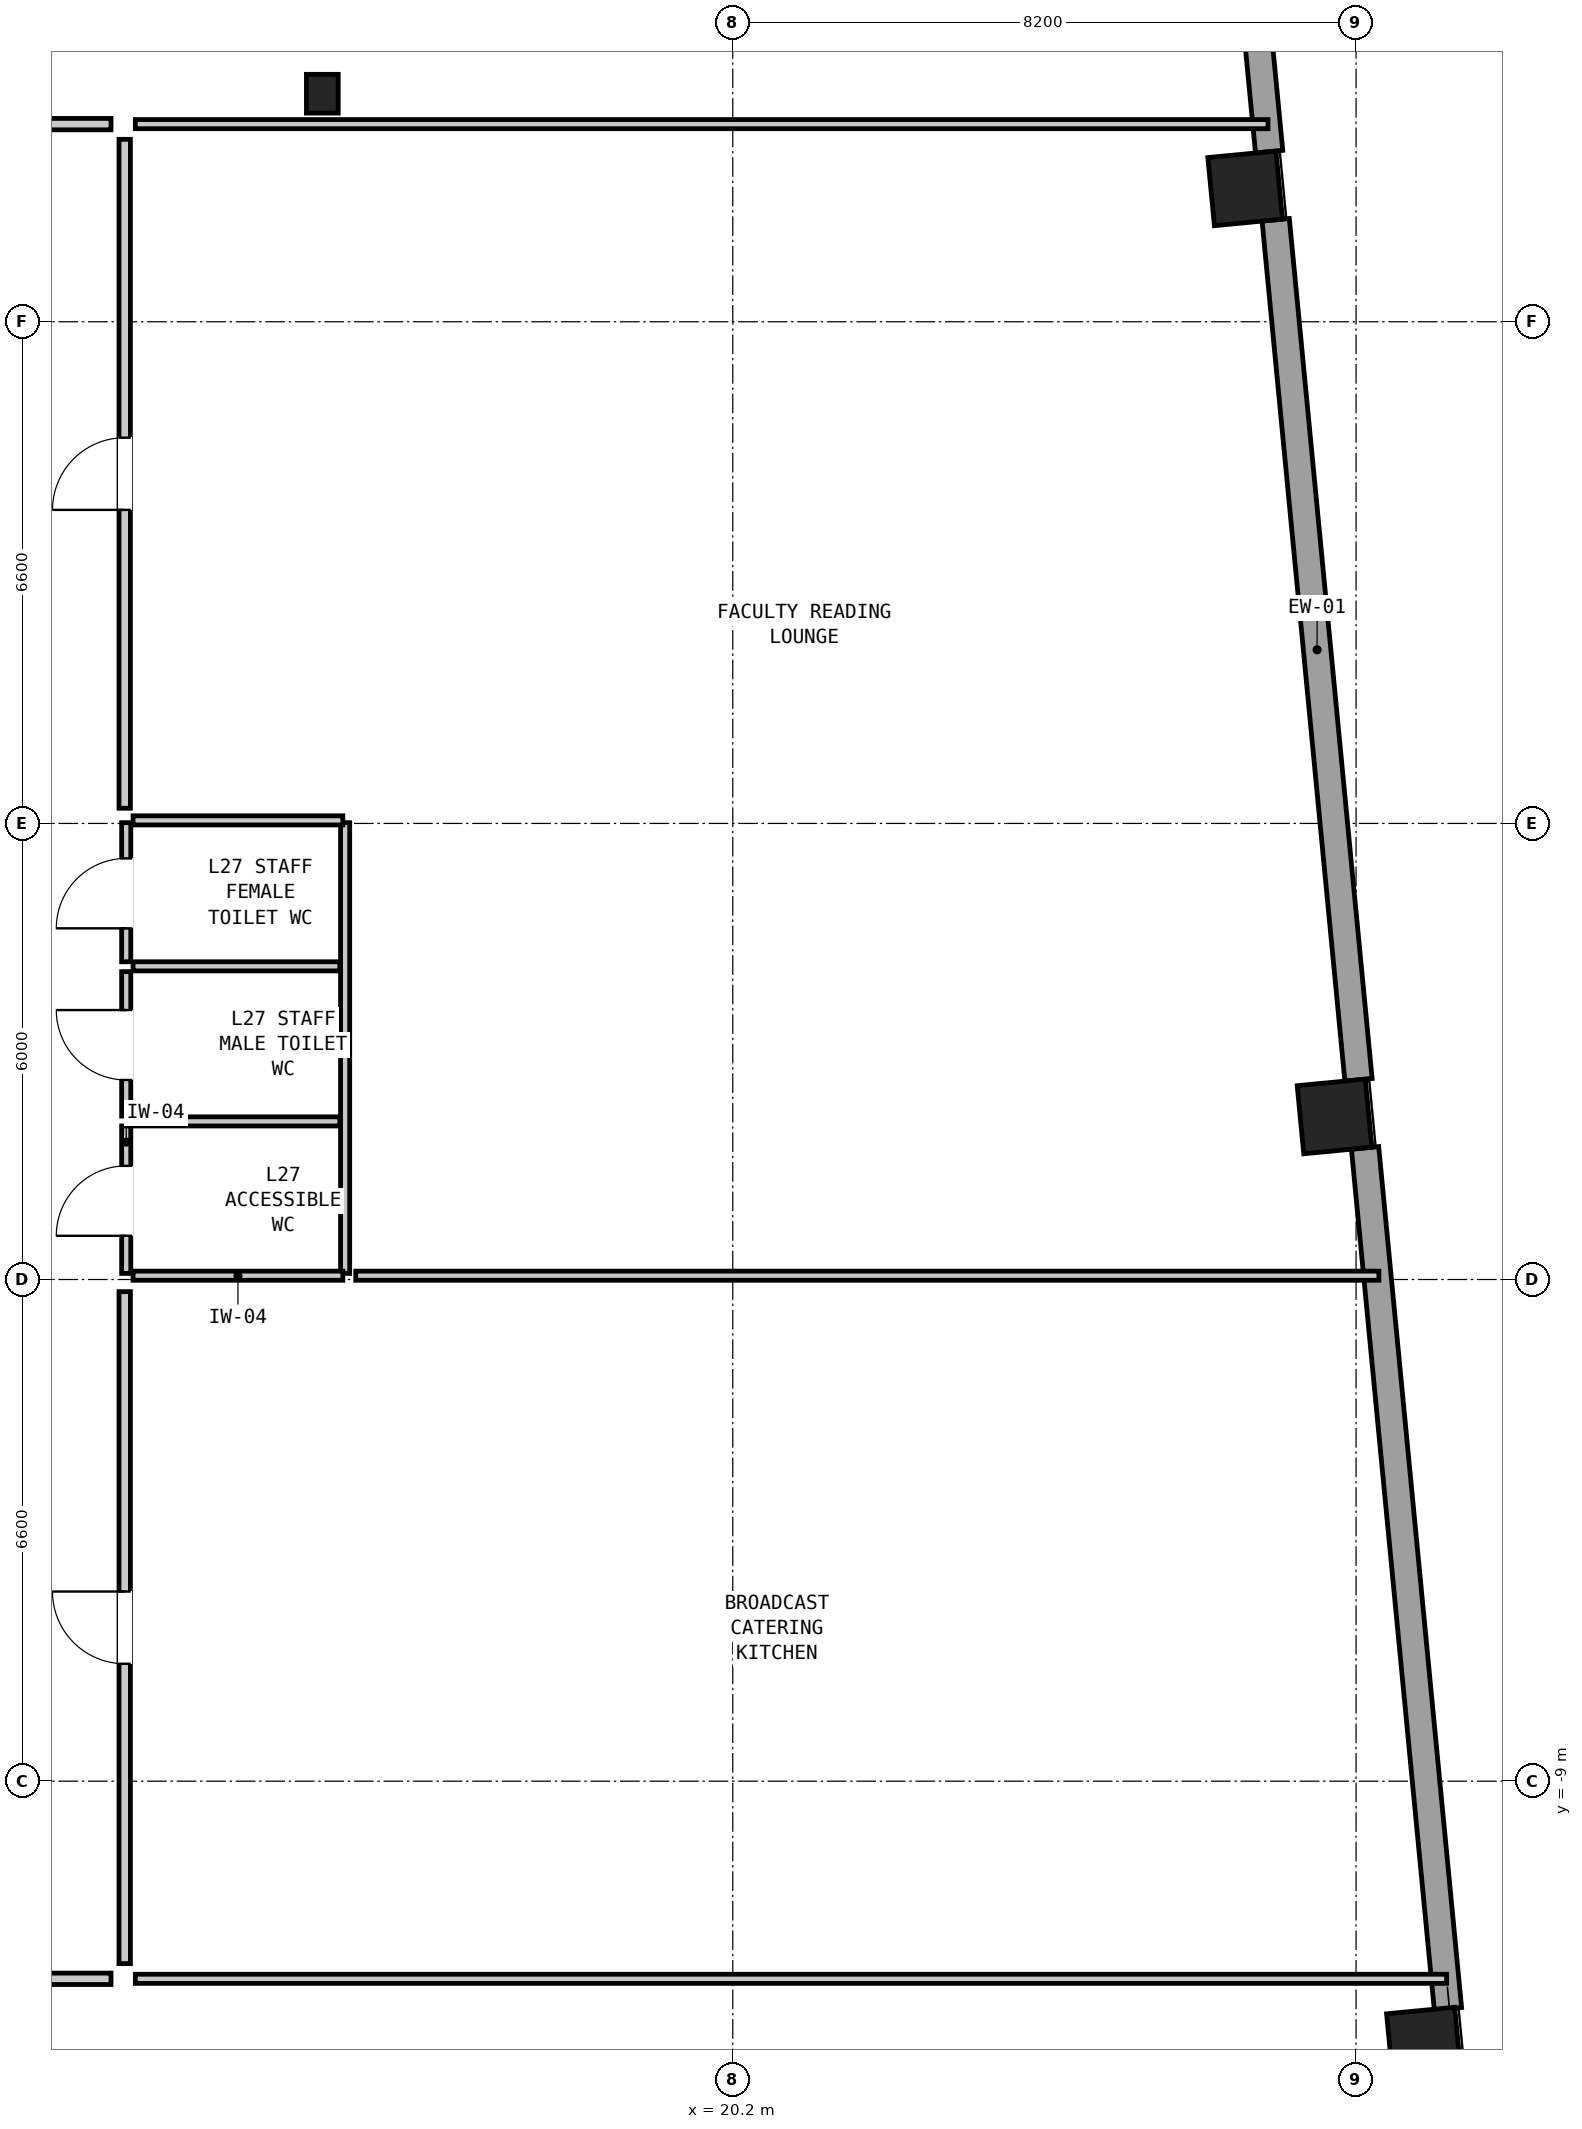
"""IFC4 building model, lengths in metres.
Left out: names, types, materials, properties, quantities, classifications, styles, units other than length and angle.
Written with IfcOpenShell. Run it as: python <this file> out.ifc"""

import sys

from ifc_helpers import new_model, si_unit, direction, frame, frame_2d, origin, origin_2d, place, context, subcontext, project, spatial, rectangle, hollow_rectangle, i_section, extrude, element, fill, save


model = new_model("IFC4")
c1 = context("Model", 3, precision=1e-05, world=origin(), true_north=direction((0.0, 1.0)))
c2 = subcontext(c1, "Body", "Model", "MODEL_VIEW")
j1 = project(units=[si_unit("LENGTHUNIT", "METRE"), si_unit("PLANEANGLEUNIT", "RADIAN")], contexts=[c1])
p1 = place(None, origin())
s1 = spatial("IfcSite", under=j1, at=p1, CompositionType="ELEMENT")
p2 = place(p1, origin())
s2 = spatial("IfcBuilding", under=s1, at=p2, CompositionType="ELEMENT")
p3 = place(p2, frame((0.0, 0.0, 93.85)))
s3 = spatial("IfcBuildingStorey", under=s2, at=p3, CompositionType="ELEMENT", Elevation=93.85)
for number, where, z_axis, x_axis in (
    (1, (29.292, -12.465, 0.0), (0.0, 0.0, 1.0), (-0.096, 0.995, 0.0)),
    (2, (28.117, -0.255, 0.0), (0.0, 0.0, 1.0), (-0.096, 0.995, 0.0)),
    (3, (26.941, 11.955, 0.0), (0.0, 0.0, 1.0), (-0.096, 0.995, 0.0)),
):
    element("IfcColumn", number, at=place(p3, frame(where, z_axis=z_axis, x_axis=x_axis)), inside=s3, PredefinedType="COLUMN", context=c2, shape_type="SweptSolid", body=[
        extrude(hollow_rectangle(XDim=0.9, YDim=0.9, WallThickness=0.055, at=origin_2d()), origin(), (0.0, 0.0, 1.0), 3.05),
    ])
p4 = place(p3, frame((14.8, 13.2, 0.0), z_axis=(0.0, 0.0, 1.0), x_axis=(1.0, 0.0, 0.0)))
e4 = element("IfcColumn", 4, at=p4, inside=s3, PredefinedType="COLUMN", context=c2, shape_type="SweptSolid", body=[
    extrude(i_section(OverallWidth=0.418, OverallDepth=0.51, WebThickness=0.042, FlangeThickness=0.068, at=origin_2d()), origin(), (0.0, 0.0, 1.0), 3.05),
])
p5 = place(p3, frame((26.166, 23.764, 0.0), z_axis=(0.0, 0.0, 1.0), x_axis=(0.095844869758, -0.995396283367, 0.0)))
e5 = element("IfcWall", 5, at=p5, inside=s3, PredefinedType="SOLIDWALL", context=c2, shape_type="SweptSolid", body=[
    extrude(rectangle(XDim=11.379, YDim=0.36, at=frame_2d((5.689, 0.0))), origin(), (0.0, 0.0, 1.0), 0.95),
])
p6 = place(p3, frame((27.343, 11.542, 0.0), z_axis=(0.0, 0.0, 1.0), x_axis=(0.09583887089, -0.995396860969, 0.0)))
e6 = element("IfcWall", 6, at=p6, inside=s3, PredefinedType="SOLIDWALL", context=c2, shape_type="SweptSolid", body=[
    extrude(rectangle(XDim=11.366, YDim=0.36, at=frame_2d((5.683, 0.0))), origin(), (0.0, 0.0, 1.0), 0.95),
])
p7 = place(p3, frame((28.518, -0.669, 0.0), z_axis=(0.0, 0.0, 1.0), x_axis=(0.095844869758, -0.995396283367, 0.0)))
e7 = element("IfcWall", 7, at=p7, inside=s3, PredefinedType="SOLIDWALL", context=c2, shape_type="SweptSolid", body=[
    extrude(rectangle(XDim=11.379, YDim=0.36, at=frame_2d((5.689, 0.0))), origin(), (0.0, 0.0, 1.0), 0.95),
])
p8 = place(p3, frame((12.22, -2.32, 0.0), z_axis=(0.0, 0.0, 1.0), x_axis=(0.0, 1.0, 0.0)))
e8 = element("IfcWall", 8, at=p8, inside=s3, PredefinedType="PARTITIONING", context=c2, shape_type="SweptSolid", body=[
    extrude(rectangle(XDim=1.94, YDim=0.12, at=frame_2d((0.97, 0.0))), origin(), (0.0, 0.0, 1.0), 2.83),
])
p9 = place(p8, frame((0.495, 0.0, 0.0)))
e9 = element("IfcOpeningElement", 9, at=p9, cuts=e8, PredefinedType="OPENING", context=c2, shape_type="SweptSolid", body=[
    extrude(rectangle(XDim=0.92, YDim=2.1, at=frame_2d((0.46, 1.05))), frame((0.0, 0.072, 0.0), z_axis=(0.0, -1.0, 0.0), x_axis=(1.0, 0.0, 0.0)), (0.0, 0.0, 1.0), 0.144),
])
p10 = place(p3, frame((12.22, -0.25, 0.0), z_axis=(0.0, 0.0, 1.0), x_axis=(0.0, 1.0, 0.0)))
e10 = element("IfcWall", 10, at=p10, inside=s3, PredefinedType="PARTITIONING", context=c2, shape_type="SweptSolid", body=[
    extrude(rectangle(XDim=1.9, YDim=0.12, at=frame_2d((0.95, 0.0))), origin(), (0.0, 0.0, 1.0), 2.83),
])
p11 = place(p10, frame((0.475, 0.0, 0.0)))
e11 = element("IfcOpeningElement", 11, at=p11, cuts=e10, PredefinedType="OPENING", context=c2, shape_type="SweptSolid", body=[
    extrude(rectangle(XDim=0.92, YDim=2.1, at=frame_2d((0.46, 1.05))), frame((0.0, 0.072, 0.0), z_axis=(0.0, -1.0, 0.0), x_axis=(1.0, 0.0, 0.0)), (0.0, 0.0, 1.0), 0.144),
])
p12 = place(p3, frame((12.22, 1.78, 0.0), z_axis=(0.0, 0.0, 1.0), x_axis=(0.0, 1.0, 0.0)))
e12 = element("IfcWall", 12, at=p12, inside=s3, PredefinedType="PARTITIONING", context=c2, shape_type="SweptSolid", body=[
    extrude(rectangle(XDim=1.83, YDim=0.12, at=frame_2d((0.915, 0.0))), origin(), (0.0, 0.0, 1.0), 2.83),
])
p13 = place(p12, frame((0.44, 0.0, 0.0)))
e13 = element("IfcOpeningElement", 13, at=p13, cuts=e12, PredefinedType="OPENING", context=c2, shape_type="SweptSolid", body=[
    extrude(rectangle(XDim=0.92, YDim=2.1, at=frame_2d((0.46, 1.05))), frame((0.0, 0.072, 0.0), z_axis=(0.0, -1.0, 0.0), x_axis=(1.0, 0.0, 0.0)), (0.0, 0.0, 1.0), 0.144),
])
p14 = place(p3, frame((15.1, -2.32, 0.0), z_axis=(0.0, 0.0, 1.0), x_axis=(0.0, 1.0, 0.0)))
e14 = element("IfcWall", 14, at=p14, inside=s3, PredefinedType="PARTITIONING", context=c2, shape_type="SweptSolid", body=[
    extrude(rectangle(XDim=5.93, YDim=0.12, at=frame_2d((2.965, 0.0))), origin(), (0.0, 0.0, 1.0), 2.83),
])
for number, where, z_axis, x_axis in (
    (15, (12.31, -2.35, 0.0), (0.0, 0.0, 1.0), (1.0, 0.0, 0.0)),
    (16, (12.31, 3.64, 0.0), (0.0, 0.0, 1.0), (1.0, 0.0, 0.0)),
):
    element("IfcWall", number, at=place(p3, frame(where, z_axis=z_axis, x_axis=x_axis)), inside=s3, PredefinedType="PARTITIONING", context=c2, shape_type="SweptSolid", body=[
        extrude(rectangle(XDim=2.76, YDim=0.12, at=frame_2d((1.38, 0.0))), origin(), (0.0, 0.0, 1.0), 1.01),
    ])
for number, where, z_axis, x_axis in (
    (17, (12.31, -0.32, 0.0), (0.0, 0.0, 1.0), (1.0, 0.0, 0.0)),
    (18, (12.31, 1.72, 0.0), (0.0, 0.0, 1.0), (1.0, 0.0, 0.0)),
):
    element("IfcWall", number, at=place(p3, frame(where, z_axis=z_axis, x_axis=x_axis)), inside=s3, PredefinedType="PARTITIONING", context=c2, shape_type="SweptSolid", body=[
        extrude(rectangle(XDim=2.72, YDim=0.12, at=frame_2d((1.36, 0.0))), origin(), (0.0, 0.0, 1.0), 2.83),
    ])
p15 = place(p3, frame((12.34, 12.8, 0.0), z_axis=(0.0, 0.0, 1.0), x_axis=(1.0, 0.0, 0.0)))
e19 = element("IfcWall", 19, at=p15, inside=s3, PredefinedType="PARTITIONING", context=c2, shape_type="SweptSolid", body=[
    extrude(rectangle(XDim=14.902, YDim=0.12, at=frame_2d((7.451, 0.0))), origin(), (0.0, 0.0, 1.0), 2.83),
])
p16 = place(p3, frame((12.34, -11.6, 0.0), z_axis=(0.0, 0.0, 1.0), x_axis=(1.0, 0.0, 0.0)))
e20 = element("IfcWall", 20, at=p16, inside=s3, PredefinedType="PARTITIONING", context=c2, shape_type="SweptSolid", body=[
    extrude(rectangle(XDim=17.251, YDim=0.12, at=frame_2d((8.625, 0.0))), origin(), (0.0, 0.0, 1.0), 2.274),
])
p17 = place(p3, frame((15.24, -2.35, 0.0), z_axis=(0.0, 0.0, 1.0), x_axis=(1.0, 0.0, 0.0)))
e21 = element("IfcWall", 21, at=p17, inside=s3, PredefinedType="PARTITIONING", context=c2, shape_type="SweptSolid", body=[
    extrude(rectangle(XDim=13.46, YDim=0.12, at=frame_2d((6.73, 0.0))), origin(), (0.0, 0.0, 1.0), 1.01),
])
p18 = place(p3, frame((5.58, 12.8, 0.0), z_axis=(0.0, 0.0, 1.0), x_axis=(1.0, 0.0, 0.0)))
e22 = element("IfcWall", 22, at=p18, inside=s3, PredefinedType="PARTITIONING", context=c2, shape_type="SweptSolid", body=[
    extrude(rectangle(XDim=6.44, YDim=0.15, at=frame_2d((3.22, 0.0))), origin(), (0.0, 0.0, 1.0), 2.83),
])
p19 = place(p18, frame((2.22, 0.0, 0.0)))
e23 = element("IfcOpeningElement", 23, at=p19, cuts=e22, PredefinedType="OPENING", context=c2, shape_type="SweptSolid", body=[
    extrude(rectangle(XDim=1.2, YDim=2.1, at=frame_2d((0.6, 1.05))), frame((0.0, 0.087, 0.0), z_axis=(0.0, -1.0, 0.0), x_axis=(1.0, 0.0, 0.0)), (0.0, 0.0, 1.0), 0.174),
])
p20 = place(p3, frame((0.18, -11.6, 0.0), z_axis=(0.0, 0.0, 1.0), x_axis=(1.0, 0.0, 0.0)))
e24 = element("IfcWall", 24, at=p20, inside=s3, PredefinedType="PARTITIONING", context=c2, shape_type="SweptSolid", body=[
    extrude(rectangle(XDim=11.84, YDim=0.15, at=frame_2d((5.92, 0.0))), origin(), (0.0, 0.0, 1.0), 2.274),
])
p21 = place(p20, frame((5.32, 0.0, 0.0)))
e25 = element("IfcOpeningElement", 25, at=p21, cuts=e24, PredefinedType="OPENING", context=c2, shape_type="SweptSolid", body=[
    extrude(rectangle(XDim=1.2, YDim=2.1, at=frame_2d((0.6, 1.05))), frame((0.0, 0.087, 0.0), z_axis=(0.0, -1.0, 0.0), x_axis=(1.0, 0.0, 0.0)), (0.0, 0.0, 1.0), 0.174),
])
p22 = place(p3, frame((12.2, -11.4, 0.0), z_axis=(0.0, 0.0, 1.0), x_axis=(0.0, 1.0, 0.0)))
e26 = element("IfcWall", 26, at=p22, inside=s3, PredefinedType="PARTITIONING", context=c2, shape_type="SweptSolid", body=[
    extrude(rectangle(XDim=8.84, YDim=0.15, at=frame_2d((4.42, 0.0))), origin(), (0.0, 0.0, 1.0), 2.83),
])
p23 = place(p22, frame((3.945, 0.0, 0.0)))
e27 = element("IfcOpeningElement", 27, at=p23, cuts=e26, PredefinedType="OPENING", context=c2, shape_type="SweptSolid", body=[
    extrude(rectangle(XDim=0.95, YDim=2.1, at=frame_2d((0.475, 1.05))), frame((0.0, 0.087, 0.0), z_axis=(0.0, -1.0, 0.0), x_axis=(1.0, 0.0, 0.0)), (0.0, 0.0, 1.0), 0.174),
])
p24 = place(p3, frame((12.2, 3.8, 0.0), z_axis=(0.0, 0.0, 1.0), x_axis=(0.0, 1.0, 0.0)))
e28 = element("IfcWall", 28, at=p24, inside=s3, PredefinedType="PARTITIONING", context=c2, shape_type="SweptSolid", body=[
    extrude(rectangle(XDim=8.8, YDim=0.15, at=frame_2d((4.4, 0.0))), origin(), (0.0, 0.0, 1.0), 2.83),
])
p25 = place(p24, frame((3.925, 0.0, 0.0)))
e29 = element("IfcOpeningElement", 29, at=p25, cuts=e28, PredefinedType="OPENING", context=c2, shape_type="SweptSolid", body=[
    extrude(rectangle(XDim=0.95, YDim=2.1, at=frame_2d((0.475, 1.05))), frame((0.0, 0.087, 0.0), z_axis=(0.0, -1.0, 0.0), x_axis=(1.0, 0.0, 0.0)), (0.0, 0.0, 1.0), 0.174),
])
p26 = place(p9, origin())
e30 = element("IfcDoor", 30, at=p26, inside=s3, OperationType="SINGLE_SWING_LEFT", PredefinedType="DOOR", context=c2, shape_type="SweptSolid", body=[
    extrude(rectangle(XDim=0.92, YDim=2.1, at=frame_2d((0.46, 1.05))), frame((0.0, 0.025, 0.0), z_axis=(0.0, -1.0, 0.0), x_axis=(1.0, 0.0, 0.0)), (0.0, 0.0, 1.0), 0.05),
])
fill(e9, e30)
p27 = place(p11, origin())
e31 = element("IfcDoor", 31, at=p27, inside=s3, OperationType="SINGLE_SWING_RIGHT", PredefinedType="DOOR", context=c2, shape_type="SweptSolid", body=[
    extrude(rectangle(XDim=0.92, YDim=2.1, at=frame_2d((0.46, 1.05))), frame((0.0, 0.025, 0.0), z_axis=(0.0, -1.0, 0.0), x_axis=(1.0, 0.0, 0.0)), (0.0, 0.0, 1.0), 0.05),
])
fill(e11, e31)
p28 = place(p13, origin())
e32 = element("IfcDoor", 32, at=p28, inside=s3, OperationType="SINGLE_SWING_LEFT", PredefinedType="DOOR", context=c2, shape_type="SweptSolid", body=[
    extrude(rectangle(XDim=0.92, YDim=2.1, at=frame_2d((0.46, 1.05))), frame((0.0, 0.025, 0.0), z_axis=(0.0, -1.0, 0.0), x_axis=(1.0, 0.0, 0.0)), (0.0, 0.0, 1.0), 0.05),
])
fill(e13, e32)
p29 = place(p23, origin())
e33 = element("IfcDoor", 33, at=p29, inside=s3, OperationType="SINGLE_SWING_RIGHT", PredefinedType="DOOR", context=c2, shape_type="SweptSolid", body=[
    extrude(rectangle(XDim=0.95, YDim=2.1, at=frame_2d((0.475, 1.05))), frame((0.0, 0.025, 0.0), z_axis=(0.0, -1.0, 0.0), x_axis=(1.0, 0.0, 0.0)), (0.0, 0.0, 1.0), 0.05),
])
fill(e27, e33)
p30 = place(p25, origin())
e34 = element("IfcDoor", 34, at=p30, inside=s3, OperationType="SINGLE_SWING_LEFT", PredefinedType="DOOR", context=c2, shape_type="SweptSolid", body=[
    extrude(rectangle(XDim=0.95, YDim=2.1, at=frame_2d((0.475, 1.05))), frame((0.0, 0.025, 0.0), z_axis=(0.0, -1.0, 0.0), x_axis=(1.0, 0.0, 0.0)), (0.0, 0.0, 1.0), 0.05),
])
fill(e29, e34)
save(model, sys.argv[1])
